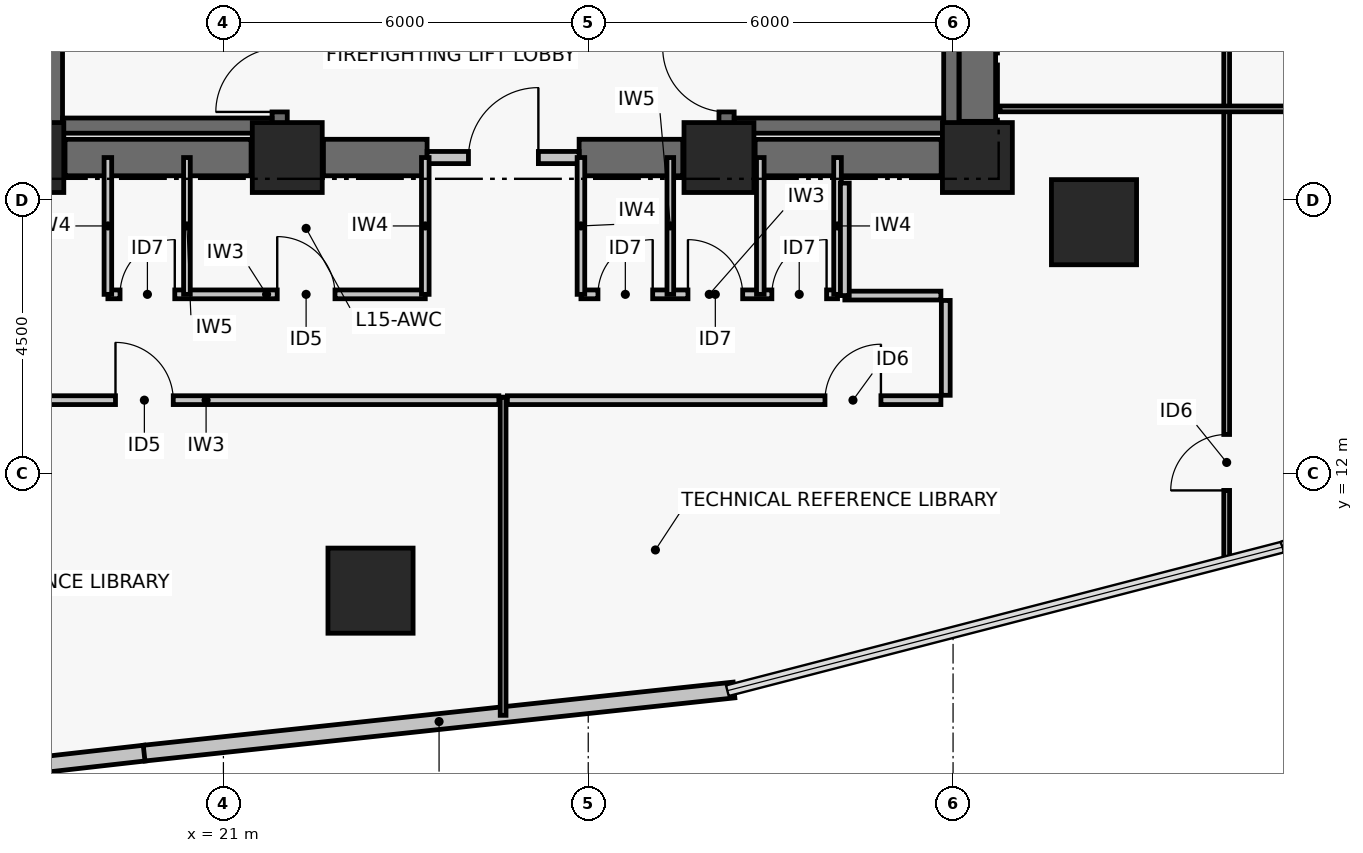
"""IFC4 building model, lengths in metres.
Left out: names, types, materials, properties, quantities, classifications, styles, units other than length and angle.
Written with IfcOpenShell. Run it as: python <this file> out.ifc"""

import sys

from ifc_helpers import new_model, si_unit, direction, frame, frame_2d, origin, origin_2d, place, context, subcontext, project, spatial, rectangle, hollow_rectangle, extrude, element, fill, save


model = new_model("IFC4")
c1 = context("Model", 3, precision=1e-05, world=origin(), true_north=direction((0.0, 1.0)))
c2 = subcontext(c1, "Body", "Model", "MODEL_VIEW")
j1 = project(units=[si_unit("LENGTHUNIT", "METRE"), si_unit("PLANEANGLEUNIT", "RADIAN")], contexts=[c1])
p1 = place(None, origin())
s1 = spatial("IfcSite", under=j1, at=p1, CompositionType="ELEMENT")
p2 = place(p1, origin())
s2 = spatial("IfcBuilding", under=s1, at=p2, CompositionType="ELEMENT")
p3 = place(p2, frame((0.0, 0.0, 64.8)))
s3 = spatial("IfcBuildingStorey", under=s2, at=p3, CompositionType="ELEMENT", Elevation=64.8)
for number, where, z_axis, x_axis in (
    (1, (17.8, 17.2, 0.0), (0.0, 0.0, 1.0), (1.0, 0.0, 0.0)),
    (2, (22.05, 17.2, 0.0), (0.0, 0.0, 1.0), (1.0, 0.0, 0.0)),
    (3, (29.15, 17.2, 0.0), (0.0, 0.0, 1.0), (1.0, 0.0, 0.0)),
    (4, (33.4, 17.2, 0.0), (0.0, 0.0, 1.0), (1.0, 0.0, 0.0)),
):
    element("IfcColumn", number, at=place(p3, frame(where, z_axis=z_axis, x_axis=x_axis)), inside=s3, PredefinedType="COLUMN", context=c2, shape_type="SweptSolid", body=[
        extrude(rectangle(XDim=1.15, YDim=1.15, at=origin_2d()), origin(), (0.0, 0.0, 1.0), 3.72),
    ])
p4 = place(p3, frame((18.395, 17.2, 0.0), z_axis=(0.0, 0.0, 1.0), x_axis=(1.0, 0.0, 0.0)))
e5 = element("IfcWall", 5, at=p4, inside=s3, PredefinedType="SHEAR", context=c2, shape_type="SweptSolid", body=[
    extrude(rectangle(XDim=3.06, YDim=0.6, at=frame_2d((1.53, 0.0))), origin(), (0.0, 0.0, 1.0), 3.44),
])
p5 = place(p3, frame((22.645, 17.2, 0.0), z_axis=(0.0, 0.0, 1.0), x_axis=(1.0, 0.0, 0.0)))
e6 = element("IfcWall", 6, at=p5, inside=s3, PredefinedType="SHEAR", context=c2, shape_type="SweptSolid", body=[
    extrude(rectangle(XDim=1.705, YDim=0.6, at=frame_2d((0.853, 0.0))), origin(), (0.0, 0.0, 1.0), 3.44),
])
p6 = place(p3, frame((26.85, 17.2, 0.0), z_axis=(0.0, 0.0, 1.0), x_axis=(1.0, 0.0, 0.0)))
e7 = element("IfcWall", 7, at=p6, inside=s3, PredefinedType="SHEAR", context=c2, shape_type="SweptSolid", body=[
    extrude(rectangle(XDim=1.705, YDim=0.6, at=frame_2d((0.853, 0.0))), origin(), (0.0, 0.0, 1.0), 3.44),
])
p7 = place(p3, frame((29.745, 17.2, 0.0), z_axis=(0.0, 0.0, 1.0), x_axis=(1.0, 0.0, 0.0)))
e8 = element("IfcWall", 8, at=p7, inside=s3, PredefinedType="SHEAR", context=c2, shape_type="SweptSolid", body=[
    extrude(rectangle(XDim=3.06, YDim=0.6, at=frame_2d((1.53, 0.0))), origin(), (0.0, 0.0, 1.0), 3.44),
])
p8 = place(p3, frame((33.4, 17.795, 0.0), z_axis=(0.0, 0.0, 1.0), x_axis=(0.0, 1.0, 0.0)))
e9 = element("IfcWall", 9, at=p8, inside=s3, PredefinedType="SHEAR", context=c2, shape_type="SweptSolid", body=[
    extrude(rectangle(XDim=8.41, YDim=0.6, at=frame_2d((4.205, 0.0))), origin(), (0.0, 0.0, 1.0), 3.44),
])
p9 = place(p3, frame((18.229, 17.6, 0.0), z_axis=(0.0, 0.0, 1.0), x_axis=(0.0, 1.0, 0.0)))
e10 = element("IfcWall", 10, at=p9, inside=s3, PredefinedType="SHEAR", context=c2, shape_type="SweptSolid", body=[
    extrude(rectangle(XDim=8.8, YDim=0.25, at=frame_2d((4.4, 0.0))), origin(), (0.0, 0.0, 1.0), 3.44),
])
p10 = place(p3, frame((21.925, 17.6, 0.0), z_axis=(0.0, 0.0, 1.0), x_axis=(0.0, 1.0, 0.0)))
e11 = element("IfcWall", 11, at=p10, inside=s3, PredefinedType="SHEAR", context=c2, shape_type="SweptSolid", body=[
    extrude(rectangle(XDim=8.8, YDim=0.25, at=frame_2d((4.4, 0.0))), origin(), (0.0, 0.0, 1.0), 3.44),
])
p11 = place(p10, frame((0.35, 0.0, 0.0)))
e12 = element("IfcOpeningElement", 12, at=p11, cuts=e11, PredefinedType="OPENING", context=c2, shape_type="SweptSolid", body=[
    extrude(rectangle(XDim=1.05, YDim=2.08, at=frame_2d((0.525, 1.04))), frame((0.0, 0.135, 0.0), z_axis=(0.0, -1.0, 0.0), x_axis=(1.0, 0.0, 0.0)), (0.0, 0.0, 1.0), 0.27),
])
p12 = place(p3, frame((18.354, 17.725, 0.0), z_axis=(0.0, 0.0, 1.0), x_axis=(1.0, 0.0, 0.0)))
e13 = element("IfcWall", 13, at=p12, inside=s3, PredefinedType="SHEAR", context=c2, shape_type="SweptSolid", body=[
    extrude(rectangle(XDim=3.446, YDim=0.25, at=frame_2d((1.723, 0.0))), origin(), (0.0, 0.0, 1.0), 3.44),
])
p13 = place(p3, frame((29.275, 17.6, 0.0), z_axis=(0.0, 0.0, 1.0), x_axis=(0.0, 1.0, 0.0)))
e14 = element("IfcWall", 14, at=p13, inside=s3, PredefinedType="SHEAR", context=c2, shape_type="SweptSolid", body=[
    extrude(rectangle(XDim=8.8, YDim=0.25, at=frame_2d((4.4, 0.0))), origin(), (0.0, 0.0, 1.0), 3.44),
])
p14 = place(p13, frame((0.35, 0.0, 0.0)))
e15 = element("IfcOpeningElement", 15, at=p14, cuts=e14, PredefinedType="OPENING", context=c2, shape_type="SweptSolid", body=[
    extrude(rectangle(XDim=1.05, YDim=2.08, at=frame_2d((0.525, 1.04))), frame((0.0, 0.135, 0.0), z_axis=(0.0, -1.0, 0.0), x_axis=(1.0, 0.0, 0.0)), (0.0, 0.0, 1.0), 0.27),
])
p15 = place(p3, frame((32.971, 17.6, 0.0), z_axis=(0.0, 0.0, 1.0), x_axis=(0.0, 1.0, 0.0)))
e16 = element("IfcWall", 16, at=p15, inside=s3, PredefinedType="SHEAR", context=c2, shape_type="SweptSolid", body=[
    extrude(rectangle(XDim=8.8, YDim=0.25, at=frame_2d((4.4, 0.0))), origin(), (0.0, 0.0, 1.0), 3.44),
])
p16 = place(p3, frame((29.4, 17.725, 0.0), z_axis=(0.0, 0.0, 1.0), x_axis=(1.0, 0.0, 0.0)))
e17 = element("IfcWall", 17, at=p16, inside=s3, PredefinedType="SHEAR", context=c2, shape_type="SweptSolid", body=[
    extrude(rectangle(XDim=3.446, YDim=0.25, at=frame_2d((1.723, 0.0))), origin(), (0.0, 0.0, 1.0), 3.44),
])
for number, where, z_axis, x_axis in (
    (18, (23.419, 10.077, 0.0), (0.0, 0.0, 1.0), (1.0, 0.0, 0.0)),
    (19, (35.318, 16.137, 0.0), (0.0, 0.0, 1.0), (1.0, 0.0, 0.0)),
):
    element("IfcColumn", number, at=place(p3, frame(where, z_axis=z_axis, x_axis=x_axis)), inside=s3, PredefinedType="COLUMN", context=c2, shape_type="SweptSolid", body=[
        extrude(hollow_rectangle(XDim=1.4, YDim=1.4, WallThickness=0.055, at=origin_2d()), origin(), (0.0, 0.0, 1.0), 3.72),
    ])
p17 = place(p3, frame((19.708, 7.406, 0.0), z_axis=(0.0, 0.0, 1.0), x_axis=(-0.993630237788, -0.112689620435, 0.0)))
e20 = element("IfcWall", 20, at=p17, inside=s3, PredefinedType="PARTITIONING", context=c2, shape_type="SweptSolid", body=[
    extrude(rectangle(XDim=4.829, YDim=0.26, at=frame_2d((2.415, 0.0))), origin(), (0.0, 0.0, 1.0), 3.44),
])
p18 = place(p3, frame((29.398, 8.444, 0.0), z_axis=(0.0, 0.0, 1.0), x_axis=(-0.994319088673, -0.106440358419, 0.0)))
e21 = element("IfcWall", 21, at=p18, inside=s3, PredefinedType="PARTITIONING", context=c2, shape_type="SweptSolid", body=[
    extrude(rectangle(XDim=9.757, YDim=0.26, at=frame_2d((4.879, 0.0))), origin(), (0.0, 0.0, 1.0), 3.44),
])
p19 = place(p3, frame((24.35, 17.2, 0.0), z_axis=(0.0, 0.0, 1.0), x_axis=(1.0, 0.0, 0.0)))
e22 = element("IfcWall", 22, at=p19, inside=s3, PredefinedType="PARTITIONING", context=c2, shape_type="SweptSolid", body=[
    extrude(rectangle(XDim=2.5, YDim=0.2, at=frame_2d((1.25, 0.0))), origin(), (0.0, 0.0, 1.0), 2.57),
])
p20 = place(p19, frame((0.68, 0.0, 0.0)))
e23 = element("IfcOpeningElement", 23, at=p20, cuts=e22, PredefinedType="OPENING", context=c2, shape_type="SweptSolid", body=[
    extrude(rectangle(XDim=1.15, YDim=2.08, at=frame_2d((0.575, 1.04))), frame((0.0, 0.11, 0.0), z_axis=(0.0, -1.0, 0.0), x_axis=(1.0, 0.0, 0.0)), (0.0, 0.0, 1.0), 0.22),
])
p21 = place(p3, frame((19.1, 14.95, 0.0), z_axis=(0.0, 0.0, 1.0), x_axis=(1.0, 0.0, 0.0)))
e24 = element("IfcWall", 24, at=p21, inside=s3, PredefinedType="PARTITIONING", context=c2, shape_type="SweptSolid", body=[
    extrude(rectangle(XDim=5.22, YDim=0.145, at=frame_2d((2.61, 0.0))), origin(), (0.0, 0.0, 1.0), 2.57),
])
p22 = place(p21, frame((0.2, 0.0, 0.0)))
e25 = element("IfcOpeningElement", 25, at=p22, cuts=e24, PredefinedType="OPENING", context=c2, shape_type="SweptSolid", body=[
    extrude(rectangle(XDim=0.9, YDim=2.02, at=frame_2d((0.45, 1.01))), frame((0.0, 0.083, 0.0), z_axis=(0.0, -1.0, 0.0), x_axis=(1.0, 0.0, 0.0)), (0.0, 0.0, 1.0), 0.165),
])
p23 = place(p21, frame((2.785, 0.0, 0.0)))
e26 = element("IfcOpeningElement", 26, at=p23, cuts=e24, PredefinedType="OPENING", context=c2, shape_type="SweptSolid", body=[
    extrude(rectangle(XDim=0.95, YDim=2.06, at=frame_2d((0.475, 1.03))), frame((0.0, 0.083, 0.0), z_axis=(0.0, -1.0, 0.0), x_axis=(1.0, 0.0, 0.0)), (0.0, 0.0, 1.0), 0.165),
])
p24 = place(p3, frame((26.88, 14.95, 0.0), z_axis=(0.0, 0.0, 1.0), x_axis=(1.0, 0.0, 0.0)))
e27 = element("IfcWall", 27, at=p24, inside=s3, PredefinedType="PARTITIONING", context=c2, shape_type="SweptSolid", body=[
    extrude(rectangle(XDim=4.22, YDim=0.145, at=frame_2d((2.11, 0.0))), origin(), (0.0, 0.0, 1.0), 2.97),
])
p25 = place(p24, frame((0.28, 0.0, 0.0)))
e28 = element("IfcOpeningElement", 28, at=p25, cuts=e27, PredefinedType="OPENING", context=c2, shape_type="SweptSolid", body=[
    extrude(rectangle(XDim=0.9, YDim=2.02, at=frame_2d((0.45, 1.01))), frame((0.0, 0.083, 0.0), z_axis=(0.0, -1.0, 0.0), x_axis=(1.0, 0.0, 0.0)), (0.0, 0.0, 1.0), 0.165),
])
p26 = place(p24, frame((1.76, 0.0, 0.0)))
e29 = element("IfcOpeningElement", 29, at=p26, cuts=e27, PredefinedType="OPENING", context=c2, shape_type="SweptSolid", body=[
    extrude(rectangle(XDim=0.9, YDim=2.02, at=frame_2d((0.45, 1.01))), frame((0.0, 0.083, 0.0), z_axis=(0.0, -1.0, 0.0), x_axis=(1.0, 0.0, 0.0)), (0.0, 0.0, 1.0), 0.165),
])
p27 = place(p24, frame((3.14, 0.0, 0.0)))
e30 = element("IfcOpeningElement", 30, at=p27, cuts=e27, PredefinedType="OPENING", context=c2, shape_type="SweptSolid", body=[
    extrude(rectangle(XDim=0.9, YDim=2.02, at=frame_2d((0.45, 1.01))), frame((0.0, 0.083, 0.0), z_axis=(0.0, -1.0, 0.0), x_axis=(1.0, 0.0, 0.0)), (0.0, 0.0, 1.0), 0.165),
])
p28 = place(p3, frame((19.1, 14.95, 0.0), z_axis=(0.0, 0.0, 1.0), x_axis=(0.0, 1.0, 0.0)))
e31 = element("IfcWall", 31, at=p28, inside=s3, PredefinedType="PARTITIONING", context=c2, shape_type="SweptSolid", body=[
    extrude(rectangle(XDim=2.25, YDim=0.125, at=frame_2d((1.125, 0.0))), origin(), (0.0, 0.0, 1.0), 2.57),
])
p29 = place(p3, frame((20.4, 14.95, 0.0), z_axis=(0.0, 0.0, 1.0), x_axis=(0.0, 1.0, 0.0)))
e32 = element("IfcWall", 32, at=p29, inside=s3, PredefinedType="PARTITIONING", context=c2, shape_type="SweptSolid", body=[
    extrude(rectangle(XDim=2.25, YDim=0.11, at=frame_2d((1.125, 0.0))), origin(), (0.0, 0.0, 1.0), 2.57),
])
for number, where, z_axis, x_axis in (
    (33, (24.32, 14.95, 0.0), (0.0, 0.0, 1.0), (0.0, 1.0, 0.0)),
    (34, (26.88, 14.95, 0.0), (0.0, 0.0, 1.0), (0.0, 1.0, 0.0)),
):
    element("IfcWall", number, at=place(p3, frame(where, z_axis=z_axis, x_axis=x_axis)), inside=s3, PredefinedType="PARTITIONING", context=c2, shape_type="SweptSolid", body=[
        extrude(rectangle(XDim=2.25, YDim=0.125, at=frame_2d((1.125, 0.0))), origin(), (0.0, 0.0, 1.0), 2.57),
    ])
p30 = place(p3, frame((28.35, 14.95, 0.0), z_axis=(0.0, 0.0, 1.0), x_axis=(0.0, 1.0, 0.0)))
e35 = element("IfcWall", 35, at=p30, inside=s3, PredefinedType="PARTITIONING", context=c2, shape_type="SweptSolid", body=[
    extrude(rectangle(XDim=2.25, YDim=0.11, at=frame_2d((1.125, 0.0))), origin(), (0.0, 0.0, 1.0), 2.57),
])
for number, where, z_axis, x_axis in (
    (36, (29.83, 14.95, 0.0), (0.0, 0.0, 1.0), (0.0, 1.0, 0.0)),
    (37, (31.1, 14.95, 0.0), (0.0, 0.0, 1.0), (0.0, 1.0, 0.0)),
):
    element("IfcWall", number, at=place(p3, frame(where, z_axis=z_axis, x_axis=x_axis)), inside=s3, PredefinedType="PARTITIONING", context=c2, shape_type="SweptSolid", body=[
        extrude(rectangle(XDim=2.25, YDim=0.125, at=frame_2d((1.125, 0.0))), origin(), (0.0, 0.0, 1.0), 2.57),
    ])
p31 = place(p3, frame((15.9, 13.21, 0.0), z_axis=(0.0, 0.0, 1.0), x_axis=(1.0, 0.0, 0.0)))
e38 = element("IfcWall", 38, at=p31, inside=s3, PredefinedType="PARTITIONING", context=c2, shape_type="SweptSolid", body=[
    extrude(rectangle(XDim=9.63, YDim=0.145, at=frame_2d((4.815, 0.0))), origin(), (0.0, 0.0, 1.0), 2.57),
])
p32 = place(p31, frame((3.325, 0.0, 0.0)))
e39 = element("IfcOpeningElement", 39, at=p32, cuts=e38, PredefinedType="OPENING", context=c2, shape_type="SweptSolid", body=[
    extrude(rectangle(XDim=0.95, YDim=2.06, at=frame_2d((0.475, 1.03))), frame((0.0, 0.083, 0.0), z_axis=(0.0, -1.0, 0.0), x_axis=(1.0, 0.0, 0.0)), (0.0, 0.0, 1.0), 0.165),
])
p33 = place(p3, frame((25.67, 13.21, 0.0), z_axis=(0.0, 0.0, 1.0), x_axis=(1.0, 0.0, 0.0)))
e40 = element("IfcWall", 40, at=p33, inside=s3, PredefinedType="PARTITIONING", context=c2, shape_type="SweptSolid", body=[
    extrude(rectangle(XDim=7.13, YDim=0.145, at=frame_2d((3.565, 0.0))), origin(), (0.0, 0.0, 1.0), 2.82),
])
p34 = place(p33, frame((5.224, 0.0, 0.0)))
e41 = element("IfcOpeningElement", 41, at=p34, cuts=e40, PredefinedType="OPENING", context=c2, shape_type="SweptSolid", body=[
    extrude(rectangle(XDim=0.92, YDim=2.05, at=frame_2d((0.46, 1.025))), frame((0.0, 0.083, 0.0), z_axis=(0.0, -1.0, 0.0), x_axis=(1.0, 0.0, 0.0)), (0.0, 0.0, 1.0), 0.165),
])
p35 = place(p3, frame((32.88, 13.29, 0.0), z_axis=(0.0, 0.0, 1.0), x_axis=(0.0, 1.0, 0.0)))
e42 = element("IfcWall", 42, at=p35, inside=s3, PredefinedType="PARTITIONING", context=c2, shape_type="SweptSolid", body=[
    extrude(rectangle(XDim=1.56, YDim=0.145, at=frame_2d((0.78, 0.0))), origin(), (0.0, 0.0, 1.0), 2.82),
])
p36 = place(p3, frame((32.8, 14.93, 0.0), z_axis=(0.0, 0.0, 1.0), x_axis=(-1.0, 0.0, 0.0)))
e43 = element("IfcWall", 43, at=p36, inside=s3, PredefinedType="PARTITIONING", context=c2, shape_type="SweptSolid", body=[
    extrude(rectangle(XDim=1.58, YDim=0.145, at=frame_2d((0.79, 0.0))), origin(), (0.0, 0.0, 1.0), 2.82),
])
p37 = place(p3, frame((31.22, 14.93, 0.0), z_axis=(0.0, 0.0, 1.0), x_axis=(0.0, 1.0, 0.0)))
e44 = element("IfcWall", 44, at=p37, inside=s3, PredefinedType="PARTITIONING", context=c2, shape_type="SweptSolid", body=[
    extrude(rectangle(XDim=1.85, YDim=0.145, at=frame_2d((0.925, 0.0))), origin(), (0.0, 0.0, 1.0), 2.57),
])
p38 = place(p3, frame((25.6, 8.027, 0.0), z_axis=(0.0, 0.0, 1.0), x_axis=(0.0, 1.0, 0.0)))
e45 = element("IfcWall", 45, at=p38, inside=s3, PredefinedType="PARTITIONING", context=c2, shape_type="SweptSolid", body=[
    extrude(rectangle(XDim=5.233, YDim=0.095, at=frame_2d((2.616, 0.0))), origin(), (0.0, 0.0, 1.0), 2.82),
])
p39 = place(p3, frame((37.5, 10.546, 0.0), z_axis=(0.0, 0.0, 1.0), x_axis=(0.0, 1.0, 0.0)))
e46 = element("IfcWall", 46, at=p39, inside=s3, PredefinedType="PARTITIONING", context=c2, shape_type="SweptSolid", body=[
    extrude(rectangle(XDim=22.909, YDim=0.095, at=frame_2d((11.454, 0.0))), origin(), (0.0, 0.0, 1.0), 2.57),
])
p40 = place(p39, frame((1.18, 0.0, 0.0)))
e47 = element("IfcOpeningElement", 47, at=p40, cuts=e46, PredefinedType="OPENING", context=c2, shape_type="SweptSolid", body=[
    extrude(rectangle(XDim=0.92, YDim=2.05, at=frame_2d((0.46, 1.025))), frame((0.0, 0.057, 0.0), z_axis=(0.0, -1.0, 0.0), x_axis=(1.0, 0.0, 0.0)), (0.0, 0.0, 1.0), 0.115),
])
p41 = place(p39, frame((10.145, 0.0, 0.0)))
e48 = element("IfcOpeningElement", 48, at=p41, cuts=e46, PredefinedType="OPENING", context=c2, shape_type="SweptSolid", body=[
    extrude(rectangle(XDim=0.92, YDim=2.05, at=frame_2d((0.46, 1.025))), frame((0.0, 0.057, 0.0), z_axis=(0.0, -1.0, 0.0), x_axis=(1.0, 0.0, 0.0)), (0.0, 0.0, 1.0), 0.115),
])
p42 = place(p39, frame((20.809, 0.0, 0.0)))
e49 = element("IfcOpeningElement", 49, at=p42, cuts=e46, PredefinedType="OPENING", context=c2, shape_type="SweptSolid", body=[
    extrude(rectangle(XDim=0.92, YDim=2.05, at=frame_2d((0.46, 1.025))), frame((0.0, 0.057, 0.0), z_axis=(0.0, -1.0, 0.0), x_axis=(1.0, 0.0, 0.0)), (0.0, 0.0, 1.0), 0.115),
])
p43 = place(p3, frame((33.77, 18.0, 0.0), z_axis=(0.0, 0.0, 1.0), x_axis=(1.0, 0.0, 0.0)))
e50 = element("IfcWall", 50, at=p43, inside=s3, PredefinedType="PARTITIONING", context=c2, shape_type="SweptSolid", body=[
    extrude(rectangle(XDim=19.078, YDim=0.095, at=frame_2d((9.539, 0.0))), origin(), (0.0, 0.0, 1.0), 2.57),
])
p44 = place(p43, frame((5.623, 0.0, 0.0)))
e51 = element("IfcOpeningElement", 51, at=p44, cuts=e50, PredefinedType="OPENING", context=c2, shape_type="SweptSolid", body=[
    extrude(rectangle(XDim=0.92, YDim=2.05, at=frame_2d((0.46, 1.025))), frame((0.0, 0.057, 0.0), z_axis=(0.0, -1.0, 0.0), x_axis=(1.0, 0.0, 0.0)), (0.0, 0.0, 1.0), 0.115),
])
p45 = place(p11, origin())
e52 = element("IfcDoor", 52, at=p45, inside=s3, OperationType="SINGLE_SWING_LEFT", PredefinedType="DOOR", context=c2, shape_type="SweptSolid", body=[
    extrude(rectangle(XDim=1.05, YDim=2.08, at=frame_2d((0.525, 1.04))), frame((0.0, 0.025, 0.0), z_axis=(0.0, -1.0, 0.0), x_axis=(1.0, 0.0, 0.0)), (0.0, 0.0, 1.0), 0.05),
])
fill(e12, e52)
p46 = place(p14, origin())
e53 = element("IfcDoor", 53, at=p46, inside=s3, OperationType="SINGLE_SWING_RIGHT", PredefinedType="DOOR", context=c2, shape_type="SweptSolid", body=[
    extrude(rectangle(XDim=1.05, YDim=2.08, at=frame_2d((0.525, 1.04))), frame((0.0, 0.025, 0.0), z_axis=(0.0, -1.0, 0.0), x_axis=(1.0, 0.0, 0.0)), (0.0, 0.0, 1.0), 0.05),
])
fill(e15, e53)
p47 = place(p20, origin())
e54 = element("IfcDoor", 54, at=p47, inside=s3, OperationType="SINGLE_SWING_RIGHT", PredefinedType="DOOR", context=c2, shape_type="SweptSolid", body=[
    extrude(rectangle(XDim=1.15, YDim=2.08, at=frame_2d((0.575, 1.04))), frame((0.0, 0.025, 0.0), z_axis=(0.0, -1.0, 0.0), x_axis=(1.0, 0.0, 0.0)), (0.0, 0.0, 1.0), 0.05),
])
fill(e23, e54)
p48 = place(p22, origin())
e55 = element("IfcDoor", 55, at=p48, inside=s3, OperationType="SINGLE_SWING_RIGHT", PredefinedType="DOOR", context=c2, shape_type="SweptSolid", body=[
    extrude(rectangle(XDim=0.9, YDim=2.02, at=frame_2d((0.45, 1.01))), frame((0.0, 0.025, 0.0), z_axis=(0.0, -1.0, 0.0), x_axis=(1.0, 0.0, 0.0)), (0.0, 0.0, 1.0), 0.05),
])
fill(e25, e55)
p49 = place(p23, origin())
e56 = element("IfcDoor", 56, at=p49, inside=s3, OperationType="SINGLE_SWING_LEFT", PredefinedType="DOOR", context=c2, shape_type="SweptSolid", body=[
    extrude(rectangle(XDim=0.95, YDim=2.06, at=frame_2d((0.475, 1.03))), frame((0.0, 0.025, 0.0), z_axis=(0.0, -1.0, 0.0), x_axis=(1.0, 0.0, 0.0)), (0.0, 0.0, 1.0), 0.05),
])
fill(e26, e56)
p50 = place(p25, origin())
e57 = element("IfcDoor", 57, at=p50, inside=s3, OperationType="SINGLE_SWING_RIGHT", PredefinedType="DOOR", context=c2, shape_type="SweptSolid", body=[
    extrude(rectangle(XDim=0.9, YDim=2.02, at=frame_2d((0.45, 1.01))), frame((0.0, 0.025, 0.0), z_axis=(0.0, -1.0, 0.0), x_axis=(1.0, 0.0, 0.0)), (0.0, 0.0, 1.0), 0.05),
])
fill(e28, e57)
p51 = place(p26, origin())
e58 = element("IfcDoor", 58, at=p51, inside=s3, OperationType="SINGLE_SWING_LEFT", PredefinedType="DOOR", context=c2, shape_type="SweptSolid", body=[
    extrude(rectangle(XDim=0.9, YDim=2.02, at=frame_2d((0.45, 1.01))), frame((0.0, 0.025, 0.0), z_axis=(0.0, -1.0, 0.0), x_axis=(1.0, 0.0, 0.0)), (0.0, 0.0, 1.0), 0.05),
])
fill(e29, e58)
p52 = place(p27, origin())
e59 = element("IfcDoor", 59, at=p52, inside=s3, OperationType="SINGLE_SWING_RIGHT", PredefinedType="DOOR", context=c2, shape_type="SweptSolid", body=[
    extrude(rectangle(XDim=0.9, YDim=2.02, at=frame_2d((0.45, 1.01))), frame((0.0, 0.025, 0.0), z_axis=(0.0, -1.0, 0.0), x_axis=(1.0, 0.0, 0.0)), (0.0, 0.0, 1.0), 0.05),
])
fill(e30, e59)
p53 = place(p32, origin())
e60 = element("IfcDoor", 60, at=p53, inside=s3, OperationType="SINGLE_SWING_LEFT", PredefinedType="DOOR", context=c2, shape_type="SweptSolid", body=[
    extrude(rectangle(XDim=0.95, YDim=2.06, at=frame_2d((0.475, 1.03))), frame((0.0, 0.025, 0.0), z_axis=(0.0, -1.0, 0.0), x_axis=(1.0, 0.0, 0.0)), (0.0, 0.0, 1.0), 0.05),
])
fill(e39, e60)
p54 = place(p34, origin())
e61 = element("IfcDoor", 61, at=p54, inside=s3, OperationType="SINGLE_SWING_RIGHT", PredefinedType="DOOR", context=c2, shape_type="SweptSolid", body=[
    extrude(rectangle(XDim=0.92, YDim=2.05, at=frame_2d((0.46, 1.025))), frame((0.0, 0.025, 0.0), z_axis=(0.0, -1.0, 0.0), x_axis=(1.0, 0.0, 0.0)), (0.0, 0.0, 1.0), 0.05),
])
fill(e41, e61)
p55 = place(p40, origin())
e62 = element("IfcDoor", 62, at=p55, inside=s3, OperationType="SINGLE_SWING_LEFT", PredefinedType="DOOR", context=c2, shape_type="SweptSolid", body=[
    extrude(rectangle(XDim=0.92, YDim=2.05, at=frame_2d((0.46, 1.025))), frame((0.0, 0.025, 0.0), z_axis=(0.0, -1.0, 0.0), x_axis=(1.0, 0.0, 0.0)), (0.0, 0.0, 1.0), 0.05),
])
fill(e47, e62)
save(model, sys.argv[1])
